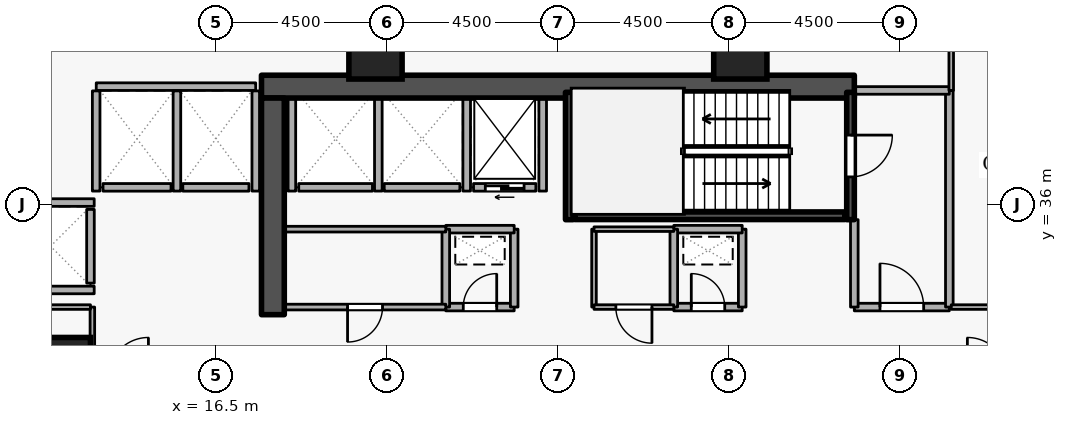
"""IFC4 building model, lengths in metres.
Left out: names, types, materials, properties, quantities, classifications, styles, units other than length and angle.
Written with IfcOpenShell. Run it as: python <this file> out.ifc"""

import sys

from ifc_helpers import new_model, si_unit, direction, frame, frame_2d, origin, origin_2d, place, context, subcontext, project, spatial, rectangle, extrude, element, fill, save


model = new_model("IFC4")
c1 = context("Model", 3, precision=1e-05, world=origin(), true_north=direction((0.0, 1.0)))
c2 = subcontext(c1, "Body", "Model", "MODEL_VIEW")
j1 = project(units=[si_unit("LENGTHUNIT", "METRE"), si_unit("PLANEANGLEUNIT", "RADIAN")], contexts=[c1])
p1 = place(None, origin())
s1 = spatial("IfcSite", under=j1, at=p1, CompositionType="ELEMENT")
p2 = place(p1, origin())
s2 = spatial("IfcBuilding", under=s1, at=p2, CompositionType="ELEMENT")
p3 = place(p2, frame((0.0, 0.0, 45.9)))
s3 = spatial("IfcBuildingStorey", under=s2, at=p3, CompositionType="ELEMENT", Elevation=45.9)
p4 = place(p3, frame((17.7, 39.1, 0.0), z_axis=(0.0, 0.0, 1.0), x_axis=(1.0, 0.0, 0.0)))
e1 = element("IfcWall", 1, at=p4, inside=s3, PredefinedType="SHEAR", context=c2, shape_type="SweptSolid", body=[
    extrude(rectangle(XDim=15.6, YDim=0.6, at=frame_2d((7.8, 0.0))), origin(), (0.0, 0.0, 1.0), 3.6),
])
p5 = place(p3, frame((18.0, 33.1, 0.0), z_axis=(0.0, 0.0, 1.0), x_axis=(0.0, 1.0, 0.0)))
e2 = element("IfcWall", 2, at=p5, inside=s3, PredefinedType="SHEAR", context=c2, shape_type="SweptSolid", body=[
    extrude(rectangle(XDim=5.7, YDim=0.6, at=frame_2d((2.85, 0.0))), origin(), (0.0, 0.0, 1.0), 3.6),
])
for number, where, z_axis, x_axis in (
    (3, (12.5, 31.8, 0.0), (0.0, 0.0, 1.0), (1.0, 0.0, 0.0)),
    (4, (20.7, 40.0, 0.0), (0.0, 0.0, 1.0), (1.0, 0.0, 0.0)),
    (5, (30.3, 40.0, 0.0), (0.0, 0.0, 1.0), (1.0, 0.0, 0.0)),
):
    element("IfcColumn", number, at=place(p3, frame(where, z_axis=z_axis, x_axis=x_axis)), inside=s3, PredefinedType="COLUMN", context=c2, shape_type="SweptSolid", body=[
        extrude(rectangle(XDim=1.4, YDim=1.4, at=origin_2d()), origin(), (0.0, 0.0, 1.0), 3.6),
    ])
p6 = place(p3, frame((24.92, 36.45, 0.0), z_axis=(0.0, 0.0, 1.0), x_axis=(-1.0, 0.0, 0.0)))
e6 = element("IfcWall", 6, at=p6, inside=s3, PredefinedType="STANDARD", context=c2, shape_type="SweptSolid", body=[
    extrude(rectangle(XDim=1.64, YDim=0.2, at=frame_2d((0.82, 0.0))), origin(), (0.0, 0.0, 1.0), 3.26),
])
p7 = place(p6, frame((0.31, 0.0, 0.0)))
e7 = element("IfcOpeningElement", 7, at=p7, cuts=e6, PredefinedType="OPENING", context=c2, shape_type="SweptSolid", body=[
    extrude(rectangle(XDim=1.02, YDim=2.06, at=frame_2d((0.51, 1.03))), frame((0.0, 0.11, 0.0), z_axis=(0.0, -1.0, 0.0), x_axis=(1.0, 0.0, 0.0)), (0.0, 0.0, 1.0), 0.22),
])
p8 = place(p3, frame((22.92, 36.45, 0.0), z_axis=(0.0, 0.0, 1.0), x_axis=(-1.0, 0.0, 0.0)))
e8 = element("IfcWall", 8, at=p8, inside=s3, PredefinedType="STANDARD", context=c2, shape_type="SweptSolid", body=[
    extrude(rectangle(XDim=1.99, YDim=0.2, at=frame_2d((0.995, 0.0))), origin(), (0.0, 0.0, 1.0), 3.26),
])
p9 = place(p3, frame((20.62, 36.45, 0.0), z_axis=(0.0, 0.0, 1.0), x_axis=(-1.0, 0.0, 0.0)))
e9 = element("IfcWall", 9, at=p9, inside=s3, PredefinedType="STANDARD", context=c2, shape_type="SweptSolid", body=[
    extrude(rectangle(XDim=1.94, YDim=0.2, at=frame_2d((0.97, 0.0))), origin(), (0.0, 0.0, 1.0), 3.26),
])
p10 = place(p3, frame((17.37, 36.45, 0.0), z_axis=(0.0, 0.0, 1.0), x_axis=(-1.0, 0.0, 0.0)))
e10 = element("IfcWall", 10, at=p10, inside=s3, PredefinedType="STANDARD", context=c2, shape_type="SweptSolid", body=[
    extrude(rectangle(XDim=1.74, YDim=0.2, at=frame_2d((0.87, 0.0))), origin(), (0.0, 0.0, 1.0), 3.26),
])
p11 = place(p3, frame((15.32, 36.45, 0.0), z_axis=(0.0, 0.0, 1.0), x_axis=(-1.0, 0.0, 0.0)))
e11 = element("IfcWall", 11, at=p11, inside=s3, PredefinedType="STANDARD", context=c2, shape_type="SweptSolid", body=[
    extrude(rectangle(XDim=1.79, YDim=0.2, at=frame_2d((0.895, 0.0))), origin(), (0.0, 0.0, 1.0), 3.26),
])
p12 = place(p3, frame((13.2, 33.93, 0.0), z_axis=(0.0, 0.0, 1.0), x_axis=(0.0, 1.0, 0.0)))
e12 = element("IfcWall", 12, at=p12, inside=s3, PredefinedType="STANDARD", context=c2, shape_type="SweptSolid", body=[
    extrude(rectangle(XDim=1.94, YDim=0.2, at=frame_2d((0.97, 0.0))), origin(), (0.0, 0.0, 1.0), 3.26),
])
for number, where, z_axis, x_axis in (
    (13, (25.1, 36.352, 0.0), (0.0, 0.0, 1.0), (0.0, 1.0, 0.0)),
    (14, (23.1, 36.352, 0.0), (0.0, 0.0, 1.0), (0.0, 1.0, 0.0)),
    (15, (20.775, 36.352, 0.0), (0.0, 0.0, 1.0), (0.0, 1.0, 0.0)),
    (16, (18.5, 36.352, 0.0), (0.0, 0.0, 1.0), (0.0, 1.0, 0.0)),
):
    element("IfcWall", number, at=place(p3, frame(where, z_axis=z_axis, x_axis=x_axis)), inside=s3, PredefinedType="STANDARD", context=c2, shape_type="SweptSolid", body=[
        extrude(rectangle(XDim=2.436, YDim=0.2, at=frame_2d((1.218, 0.0))), origin(), (0.0, 0.0, 1.0), 3.26),
    ])
p13 = place(p3, frame((13.352, 39.1, 0.0), z_axis=(0.0, 0.0, 1.0), x_axis=(1.0, 0.0, 0.0)))
e17 = element("IfcWall", 17, at=p13, inside=s3, PredefinedType="STANDARD", context=c2, shape_type="SweptSolid", body=[
    extrude(rectangle(XDim=4.196, YDim=0.2, at=frame_2d((2.098, 0.0))), origin(), (0.0, 0.0, 1.0), 3.26),
])
p14 = place(p3, frame((17.55, 36.352, 0.0), z_axis=(0.0, 0.0, 1.0), x_axis=(0.0, 1.0, 0.0)))
e18 = element("IfcWall", 18, at=p14, inside=s3, PredefinedType="STANDARD", context=c2, shape_type="SweptSolid", body=[
    extrude(rectangle(XDim=2.636, YDim=0.2, at=frame_2d((1.318, 0.0))), origin(), (0.0, 0.0, 1.0), 2.465),
])
for number, where, z_axis, x_axis in (
    (19, (15.475, 36.352, 0.0), (0.0, 0.0, 1.0), (0.0, 1.0, 0.0)),
    (20, (13.35, 36.352, 0.0), (0.0, 0.0, 1.0), (0.0, 1.0, 0.0)),
):
    element("IfcWall", number, at=place(p3, frame(where, z_axis=z_axis, x_axis=x_axis)), inside=s3, PredefinedType="STANDARD", context=c2, shape_type="SweptSolid", body=[
        extrude(rectangle(XDim=2.636, YDim=0.2, at=frame_2d((1.318, 0.0))), origin(), (0.0, 0.0, 1.0), 3.26),
    ])
for number, where, z_axis, x_axis in (
    (21, (11.002, 36.05, 0.0), (0.0, 0.0, 1.0), (1.0, 0.0, 0.0)),
    (22, (11.002, 33.75, 0.0), (0.0, 0.0, 1.0), (1.0, 0.0, 0.0)),
):
    element("IfcWall", number, at=place(p3, frame(where, z_axis=z_axis, x_axis=x_axis)), inside=s3, PredefinedType="STANDARD", context=c2, shape_type="SweptSolid", body=[
        extrude(rectangle(XDim=2.296, YDim=0.2, at=frame_2d((1.148, 0.0))), origin(), (0.0, 0.0, 1.0), 3.26),
    ])
p15 = place(p3, frame((33.2, 38.95, 0.0), z_axis=(0.0, 0.0, 1.0), x_axis=(0.0, -1.0, 0.0)))
e23 = element("IfcWall", 23, at=p15, inside=s3, PredefinedType="SHEAR", context=c2, shape_type="SweptSolid", body=[
    extrude(rectangle(XDim=3.35, YDim=0.2, at=frame_2d((1.675, 0.0))), origin(), (0.0, 0.0, 1.0), 3.6),
])
p16 = place(p15, frame((1.125, 0.0, 0.0)))
e24 = element("IfcOpeningElement", 24, at=p16, cuts=e23, PredefinedType="OPENING", context=c2, shape_type="SweptSolid", body=[
    extrude(rectangle(XDim=1.1, YDim=2.1, at=frame_2d((0.55, 1.05))), frame((0.0, 0.11, 0.0), z_axis=(0.0, -1.0, 0.0), x_axis=(1.0, 0.0, 0.0)), (0.0, 0.0, 1.0), 0.22),
])
p17 = place(p3, frame((25.8, 35.6, 0.0), z_axis=(0.0, 0.0, 1.0), x_axis=(0.0, 1.0, 0.0)))
e25 = element("IfcWall", 25, at=p17, inside=s3, PredefinedType="SHEAR", context=c2, shape_type="SweptSolid", body=[
    extrude(rectangle(XDim=3.35, YDim=0.2, at=frame_2d((1.675, 0.0))), origin(), (0.0, 0.0, 1.0), 3.6),
])
p18 = place(p3, frame((25.95, 35.703, 0.0), z_axis=(0.0, 0.0, 1.0), x_axis=(1.0, 0.0, 0.0)))
e26 = element("IfcWall", 26, at=p18, inside=s3, PredefinedType="SHEAR", context=c2, shape_type="SweptSolid", body=[
    extrude(rectangle(XDim=7.1, YDim=0.2, at=frame_2d((3.55, 0.0))), origin(), (0.0, 0.0, 1.0), 3.6),
])
p19 = place(p3, frame((33.3, 33.3, 0.0), z_axis=(0.0, 0.0, 1.0), x_axis=(1.0, 0.0, 0.0)))
e27 = element("IfcWall", 27, at=p19, inside=s3, PredefinedType="STANDARD", context=c2, shape_type="SweptSolid", body=[
    extrude(rectangle(XDim=2.5, YDim=0.2, at=frame_2d((1.25, 0.0))), origin(), (0.0, 0.0, 1.0), 3.26),
])
p20 = place(p19, frame((0.675, 0.0, 0.0)))
e28 = element("IfcOpeningElement", 28, at=p20, cuts=e27, PredefinedType="OPENING", context=c2, shape_type="SweptSolid", body=[
    extrude(rectangle(XDim=1.15, YDim=2.1, at=frame_2d((0.575, 1.05))), frame((0.0, 0.11, 0.0), z_axis=(0.0, -1.0, 0.0), x_axis=(1.0, 0.0, 0.0)), (0.0, 0.0, 1.0), 0.22),
])
p21 = place(p3, frame((35.8, 33.3, 0.0), z_axis=(0.0, 0.0, 1.0), x_axis=(0.0, 1.0, 0.0)))
e29 = element("IfcWall", 29, at=p21, inside=s3, PredefinedType="STANDARD", context=c2, shape_type="SweptSolid", body=[
    extrude(rectangle(XDim=5.7, YDim=0.2, at=frame_2d((2.85, 0.0))), origin(), (0.0, 0.0, 1.0), 3.26),
])
p22 = place(p3, frame((35.8, 39.0, 0.0), z_axis=(0.0, 0.0, 1.0), x_axis=(-1.0, 0.0, 0.0)))
e30 = element("IfcWall", 30, at=p22, inside=s3, PredefinedType="STANDARD", context=c2, shape_type="SweptSolid", body=[
    extrude(rectangle(XDim=2.5, YDim=0.2, at=frame_2d((1.25, 0.0))), origin(), (0.0, 0.0, 1.0), 3.26),
])
p23 = place(p3, frame((33.3, 35.6, 0.0), z_axis=(0.0, 0.0, 1.0), x_axis=(0.0, -1.0, 0.0)))
e31 = element("IfcWall", 31, at=p23, inside=s3, PredefinedType="STANDARD", context=c2, shape_type="SweptSolid", body=[
    extrude(rectangle(XDim=2.3, YDim=0.2, at=frame_2d((1.15, 0.0))), origin(), (0.0, 0.0, 1.0), 2.465),
])
p24 = place(p3, frame((22.55, 33.3, 0.0), z_axis=(0.0, 0.0, 1.0), x_axis=(1.0, 0.0, 0.0)))
e32 = element("IfcWall", 32, at=p24, inside=s3, PredefinedType="STANDARD", context=c2, shape_type="SweptSolid", body=[
    extrude(rectangle(XDim=1.8, YDim=0.2, at=frame_2d((0.9, 0.0))), origin(), (0.0, 0.0, 1.0), 3.26),
])
p25 = place(p24, frame((0.46, 0.0, 0.0)))
e33 = element("IfcOpeningElement", 33, at=p25, cuts=e32, PredefinedType="OPENING", context=c2, shape_type="SweptSolid", body=[
    extrude(rectangle(XDim=0.88, YDim=2.04, at=frame_2d((0.44, 1.02))), frame((0.0, 0.11, 0.0), z_axis=(0.0, -1.0, 0.0), x_axis=(1.0, 0.0, 0.0)), (0.0, 0.0, 1.0), 0.22),
])
p26 = place(p3, frame((24.35, 33.3, 0.0), z_axis=(0.0, 0.0, 1.0), x_axis=(0.0, 1.0, 0.0)))
e34 = element("IfcWall", 34, at=p26, inside=s3, PredefinedType="STANDARD", context=c2, shape_type="SweptSolid", body=[
    extrude(rectangle(XDim=2.05, YDim=0.2, at=frame_2d((1.025, 0.0))), origin(), (0.0, 0.0, 1.0), 3.26),
])
p27 = place(p3, frame((24.35, 35.35, 0.0), z_axis=(0.0, 0.0, 1.0), x_axis=(-1.0, 0.0, 0.0)))
e35 = element("IfcWall", 35, at=p27, inside=s3, PredefinedType="STANDARD", context=c2, shape_type="SweptSolid", body=[
    extrude(rectangle(XDim=1.8, YDim=0.2, at=frame_2d((0.9, 0.0))), origin(), (0.0, 0.0, 1.0), 3.26),
])
p28 = place(p3, frame((22.55, 35.35, 0.0), z_axis=(0.0, 0.0, 1.0), x_axis=(0.0, -1.0, 0.0)))
e36 = element("IfcWall", 36, at=p28, inside=s3, PredefinedType="STANDARD", context=c2, shape_type="SweptSolid", body=[
    extrude(rectangle(XDim=2.05, YDim=0.2, at=frame_2d((1.025, 0.0))), origin(), (0.0, 0.0, 1.0), 3.26),
])
p29 = place(p3, frame((28.55, 33.3, 0.0), z_axis=(0.0, 0.0, 1.0), x_axis=(1.0, 0.0, 0.0)))
e37 = element("IfcWall", 37, at=p29, inside=s3, PredefinedType="STANDARD", context=c2, shape_type="SweptSolid", body=[
    extrude(rectangle(XDim=1.8, YDim=0.2, at=frame_2d((0.9, 0.0))), origin(), (0.0, 0.0, 1.0), 3.26),
])
p30 = place(p29, frame((0.46, 0.0, 0.0)))
e38 = element("IfcOpeningElement", 38, at=p30, cuts=e37, PredefinedType="OPENING", context=c2, shape_type="SweptSolid", body=[
    extrude(rectangle(XDim=0.88, YDim=2.04, at=frame_2d((0.44, 1.02))), frame((0.0, 0.11, 0.0), z_axis=(0.0, -1.0, 0.0), x_axis=(1.0, 0.0, 0.0)), (0.0, 0.0, 1.0), 0.22),
])
p31 = place(p3, frame((30.35, 33.3, 0.0), z_axis=(0.0, 0.0, 1.0), x_axis=(0.0, 1.0, 0.0)))
e39 = element("IfcWall", 39, at=p31, inside=s3, PredefinedType="STANDARD", context=c2, shape_type="SweptSolid", body=[
    extrude(rectangle(XDim=2.05, YDim=0.2, at=frame_2d((1.025, 0.0))), origin(), (0.0, 0.0, 1.0), 3.26),
])
p32 = place(p3, frame((30.35, 35.35, 0.0), z_axis=(0.0, 0.0, 1.0), x_axis=(-1.0, 0.0, 0.0)))
e40 = element("IfcWall", 40, at=p32, inside=s3, PredefinedType="STANDARD", context=c2, shape_type="SweptSolid", body=[
    extrude(rectangle(XDim=1.8, YDim=0.2, at=frame_2d((0.9, 0.0))), origin(), (0.0, 0.0, 1.0), 3.26),
])
p33 = place(p3, frame((28.55, 35.35, 0.0), z_axis=(0.0, 0.0, 1.0), x_axis=(0.0, -1.0, 0.0)))
e41 = element("IfcWall", 41, at=p33, inside=s3, PredefinedType="STANDARD", context=c2, shape_type="SweptSolid", body=[
    extrude(rectangle(XDim=2.05, YDim=0.2, at=frame_2d((1.025, 0.0))), origin(), (0.0, 0.0, 1.0), 3.26),
])
p34 = place(p3, frame((18.3, 35.35, 0.0), z_axis=(0.0, 0.0, 1.0), x_axis=(1.0, 0.0, 0.0)))
e42 = element("IfcWall", 42, at=p34, inside=s3, PredefinedType="PARTITIONING", context=c2, shape_type="SweptSolid", body=[
    extrude(rectangle(XDim=4.25, YDim=0.15, at=frame_2d((2.125, 0.0))), origin(), (0.0, 0.0, 1.0), 3.26),
])
p35 = place(p3, frame((22.55, 33.3, 0.0), z_axis=(0.0, 0.0, 1.0), x_axis=(-1.0, 0.0, 0.0)))
e43 = element("IfcWall", 43, at=p35, inside=s3, PredefinedType="PARTITIONING", context=c2, shape_type="SweptSolid", body=[
    extrude(rectangle(XDim=4.25, YDim=0.15, at=frame_2d((2.125, 0.0))), origin(), (0.0, 0.0, 1.0), 3.26),
])
p36 = place(p35, frame((1.665, 0.0, 0.0)))
e44 = element("IfcOpeningElement", 44, at=p36, cuts=e43, PredefinedType="OPENING", context=c2, shape_type="SweptSolid", body=[
    extrude(rectangle(XDim=0.92, YDim=2.08, at=frame_2d((0.46, 1.04))), frame((0.0, 0.085, 0.0), z_axis=(0.0, -1.0, 0.0), x_axis=(1.0, 0.0, 0.0)), (0.0, 0.0, 1.0), 0.17),
])
p37 = place(p3, frame((26.45, 33.3, 0.0), z_axis=(0.0, 0.0, 1.0), x_axis=(0.0, 1.0, 0.0)))
e45 = element("IfcWall", 45, at=p37, inside=s3, PredefinedType="PARTITIONING", context=c2, shape_type="SweptSolid", body=[
    extrude(rectangle(XDim=2.05, YDim=0.12, at=frame_2d((1.025, 0.0))), origin(), (0.0, 0.0, 1.0), 3.26),
])
p38 = place(p3, frame((26.45, 35.35, 0.0), z_axis=(0.0, 0.0, 1.0), x_axis=(1.0, 0.0, 0.0)))
e46 = element("IfcWall", 46, at=p38, inside=s3, PredefinedType="PARTITIONING", context=c2, shape_type="SweptSolid", body=[
    extrude(rectangle(XDim=2.1, YDim=0.12, at=frame_2d((1.05, 0.0))), origin(), (0.0, 0.0, 1.0), 3.26),
])
p39 = place(p3, frame((28.55, 33.3, 0.0), z_axis=(0.0, 0.0, 1.0), x_axis=(-1.0, 0.0, 0.0)))
e47 = element("IfcWall", 47, at=p39, inside=s3, PredefinedType="PARTITIONING", context=c2, shape_type="SweptSolid", body=[
    extrude(rectangle(XDim=2.1, YDim=0.12, at=frame_2d((1.05, 0.0))), origin(), (0.0, 0.0, 1.0), 3.26),
])
p40 = place(p39, frame((0.575, 0.0, 0.0)))
e48 = element("IfcOpeningElement", 48, at=p40, cuts=e47, PredefinedType="OPENING", context=c2, shape_type="SweptSolid", body=[
    extrude(rectangle(XDim=0.95, YDim=2.1, at=frame_2d((0.475, 1.05))), frame((0.0, 0.07, 0.0), z_axis=(0.0, -1.0, 0.0), x_axis=(1.0, 0.0, 0.0)), (0.0, 0.0, 1.0), 0.14),
])
p41 = place(p3, frame((13.25, 33.3, 0.0), z_axis=(0.0, 0.0, 1.0), x_axis=(0.0, -1.0, 0.0)))
e49 = element("IfcWall", 49, at=p41, inside=s3, PredefinedType="PARTITIONING", context=c2, shape_type="SweptSolid", body=[
    extrude(rectangle(XDim=1.85, YDim=0.12, at=frame_2d((0.925, 0.0))), origin(), (0.0, 0.0, 1.0), 3.26),
])
p42 = place(p3, frame((10.9, 33.3, 0.0), z_axis=(0.0, 0.0, 1.0), x_axis=(1.0, 0.0, 0.0)))
e50 = element("IfcWall", 50, at=p42, inside=s3, PredefinedType="PARTITIONING", context=c2, shape_type="SweptSolid", body=[
    extrude(rectangle(XDim=2.3, YDim=0.12, at=frame_2d((1.15, 0.0))), origin(), (0.0, 0.0, 1.0), 3.26),
])
p43 = place(p3, frame((37.75, 33.3, 0.0), z_axis=(0.0, 0.0, 1.0), x_axis=(-1.0, 0.0, 0.0)))
e51 = element("IfcWall", 51, at=p43, inside=s3, PredefinedType="PARTITIONING", context=c2, shape_type="SweptSolid", body=[
    extrude(rectangle(XDim=1.9, YDim=0.12, at=frame_2d((0.95, 0.0))), origin(), (0.0, 0.0, 1.0), 3.26),
])
p44 = place(p3, frame((35.85, 39.0, 0.0), z_axis=(0.0, 0.0, 1.0), x_axis=(0.0, 1.0, 0.0)))
e52 = element("IfcWall", 52, at=p44, inside=s3, PredefinedType="PARTITIONING", context=c2, shape_type="SweptSolid", body=[
    extrude(rectangle(XDim=6.22, YDim=0.12, at=frame_2d((3.11, 0.0))), origin(), (0.0, 0.0, 1.0), 3.26),
])
p45 = place(p7, origin())
e53 = element("IfcDoor", 53, at=p45, inside=s3, OperationType="SLIDING_TO_LEFT", PredefinedType="DOOR", context=c2, shape_type="SweptSolid", body=[
    extrude(rectangle(XDim=1.02, YDim=2.06, at=frame_2d((0.51, 1.03))), frame((0.0, 0.025, 0.0), z_axis=(0.0, -1.0, 0.0), x_axis=(1.0, 0.0, 0.0)), (0.0, 0.0, 1.0), 0.05),
])
fill(e7, e53)
p46 = place(p16, origin())
e54 = element("IfcDoor", 54, at=p46, inside=s3, OperationType="SINGLE_SWING_LEFT", PredefinedType="DOOR", context=c2, shape_type="SweptSolid", body=[
    extrude(rectangle(XDim=1.1, YDim=2.1, at=frame_2d((0.55, 1.05))), frame((0.0, 0.025, 0.0), z_axis=(0.0, -1.0, 0.0), x_axis=(1.0, 0.0, 0.0)), (0.0, 0.0, 1.0), 0.05),
])
fill(e24, e54)
p47 = place(p20, origin())
e55 = element("IfcDoor", 55, at=p47, inside=s3, OperationType="SINGLE_SWING_LEFT", PredefinedType="DOOR", context=c2, shape_type="SweptSolid", body=[
    extrude(rectangle(XDim=1.15, YDim=2.1, at=frame_2d((0.575, 1.05))), frame((0.0, 0.025, 0.0), z_axis=(0.0, -1.0, 0.0), x_axis=(1.0, 0.0, 0.0)), (0.0, 0.0, 1.0), 0.05),
])
fill(e28, e55)
p48 = place(p25, origin())
e56 = element("IfcDoor", 56, at=p48, inside=s3, OperationType="SINGLE_SWING_RIGHT", PredefinedType="DOOR", context=c2, shape_type="SweptSolid", body=[
    extrude(rectangle(XDim=0.88, YDim=2.04, at=frame_2d((0.44, 1.02))), frame((0.0, 0.025, 0.0), z_axis=(0.0, -1.0, 0.0), x_axis=(1.0, 0.0, 0.0)), (0.0, 0.0, 1.0), 0.05),
])
fill(e33, e56)
p49 = place(p30, origin())
e57 = element("IfcDoor", 57, at=p49, inside=s3, OperationType="SINGLE_SWING_LEFT", PredefinedType="DOOR", context=c2, shape_type="SweptSolid", body=[
    extrude(rectangle(XDim=0.88, YDim=2.04, at=frame_2d((0.44, 1.02))), frame((0.0, 0.025, 0.0), z_axis=(0.0, -1.0, 0.0), x_axis=(1.0, 0.0, 0.0)), (0.0, 0.0, 1.0), 0.05),
])
fill(e38, e57)
p50 = place(p36, origin())
e58 = element("IfcDoor", 58, at=p50, inside=s3, OperationType="SINGLE_SWING_RIGHT", PredefinedType="DOOR", context=c2, shape_type="SweptSolid", body=[
    extrude(rectangle(XDim=0.92, YDim=2.08, at=frame_2d((0.46, 1.04))), frame((0.0, 0.025, 0.0), z_axis=(0.0, -1.0, 0.0), x_axis=(1.0, 0.0, 0.0)), (0.0, 0.0, 1.0), 0.05),
])
fill(e44, e58)
p51 = place(p40, origin())
e59 = element("IfcDoor", 59, at=p51, inside=s3, OperationType="SINGLE_SWING_LEFT", PredefinedType="DOOR", context=c2, shape_type="SweptSolid", body=[
    extrude(rectangle(XDim=0.95, YDim=2.1, at=frame_2d((0.475, 1.05))), frame((0.0, 0.025, 0.0), z_axis=(0.0, -1.0, 0.0), x_axis=(1.0, 0.0, 0.0)), (0.0, 0.0, 1.0), 0.05),
])
fill(e48, e59)
save(model, sys.argv[1])
